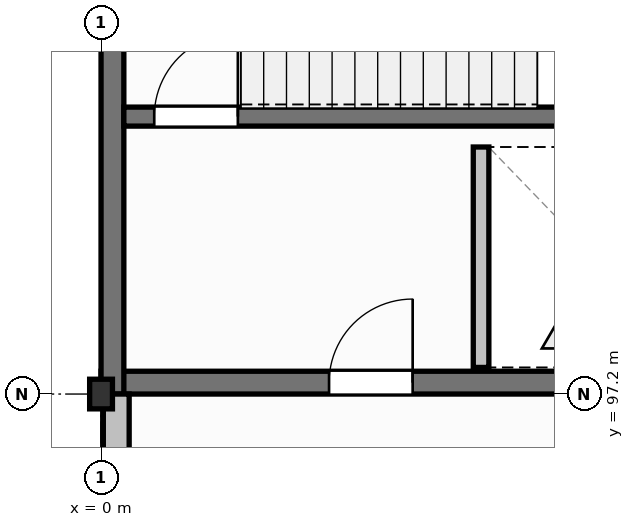
"""IFC4 building model, lengths in metres.
Left out: names, types, materials, properties, quantities, classifications, styles, units other than length and angle.
Written with IfcOpenShell. Run it as: python <this file> out.ifc"""

import sys

from ifc_helpers import new_model, si_unit, direction, frame, frame_2d, origin, origin_2d, place, context, subcontext, project, spatial, rectangle, i_section, extrude, element, fill, save


model = new_model("IFC4")
c1 = context("Model", 3, precision=1e-05, world=origin(), true_north=direction((0.0, 1.0)))
c2 = subcontext(c1, "Body", "Model", "MODEL_VIEW")
j1 = project(units=[si_unit("LENGTHUNIT", "METRE"), si_unit("PLANEANGLEUNIT", "RADIAN")], contexts=[c1])
p1 = place(None, origin())
s1 = spatial("IfcSite", under=j1, at=p1, CompositionType="ELEMENT")
p2 = place(p1, origin())
s2 = spatial("IfcBuilding", under=s1, at=p2, CompositionType="ELEMENT")
p3 = place(p2, frame((0.0, 0.0, 17.25)))
s3 = spatial("IfcBuildingStorey", under=s2, at=p3, CompositionType="ELEMENT", Elevation=17.25)
p4 = place(p3, frame((0.0, 97.35, 0.0), z_axis=(0.0, 0.0, 1.0), x_axis=(1.0, 0.0, 0.0)))
e1 = element("IfcWall", 1, at=p4, inside=s3, PredefinedType="SHEAR", context=c2, shape_type="SweptSolid", body=[
    extrude(rectangle(XDim=8.4, YDim=0.3, at=frame_2d((4.2, 0.0))), origin(), (0.0, 0.0, 1.0), 4.05),
])
p5 = place(p4, frame((3.0, 0.0, 0.0)))
e2 = element("IfcOpeningElement", 2, at=p5, cuts=e1, PredefinedType="OPENING", context=c2, shape_type="SweptSolid", body=[
    extrude(rectangle(XDim=1.1, YDim=2.15, at=frame_2d((0.55, 1.075))), frame((0.0, 0.16, 0.0), z_axis=(0.0, -1.0, 0.0), x_axis=(1.0, 0.0, 0.0)), (0.0, 0.0, 1.0), 0.32),
])
p6 = place(p3, frame((0.15, 97.2, 0.0), z_axis=(0.0, 0.0, 1.0), x_axis=(0.0, 1.0, 0.0)))
e3 = element("IfcWall", 3, at=p6, inside=s3, PredefinedType="SHEAR", context=c2, shape_type="SweptSolid", body=[
    extrude(rectangle(XDim=7.2, YDim=0.3, at=frame_2d((3.6, 0.0))), origin(), (0.0, 0.0, 1.0), 4.05),
])
p7 = place(p3, frame((0.3, 100.85, 0.0), z_axis=(0.0, 0.0, 1.0), x_axis=(1.0, 0.0, 0.0)))
e4 = element("IfcWall", 4, at=p7, inside=s3, PredefinedType="SHEAR", context=c2, shape_type="SweptSolid", body=[
    extrude(rectangle(XDim=7.8, YDim=0.25, at=frame_2d((3.9, 0.0))), origin(), (0.0, 0.0, 1.0), 4.05),
])
p8 = place(p7, frame((0.4, 0.0, 0.0)))
e5 = element("IfcOpeningElement", 5, at=p8, cuts=e4, PredefinedType="OPENING", context=c2, shape_type="SweptSolid", body=[
    extrude(rectangle(XDim=1.1, YDim=2.15, at=frame_2d((0.55, 1.075))), frame((0.0, 0.135, 0.0), z_axis=(0.0, -1.0, 0.0), x_axis=(1.0, 0.0, 0.0)), (0.0, 0.0, 1.0), 0.27),
])
p9 = place(p3, frame((0.0, 97.2, 0.0), z_axis=(0.0, 0.0, 1.0), x_axis=(1.0, 0.0, 0.0)))
e6 = element("IfcColumn", 6, at=p9, inside=s3, PredefinedType="COLUMN", context=c2, shape_type="SweptSolid", body=[
    extrude(i_section(OverallWidth=0.3, OverallDepth=0.39, WebThickness=0.011, FlangeThickness=0.019, FilletRadius=0.027, at=origin_2d()), origin(), (0.0, 0.0, 1.0), 4.05),
])
p10 = place(p3, frame((0.2, 90.0, 0.0), z_axis=(0.0, 0.0, 1.0), x_axis=(0.0, 1.0, 0.0)))
e7 = element("IfcWall", 7, at=p10, inside=s3, PredefinedType="SOLIDWALL", context=c2, shape_type="SweptSolid", body=[
    extrude(rectangle(XDim=7.2, YDim=0.34, at=frame_2d((3.6, 0.0))), origin(), (0.0, 0.0, 1.0), 3.328),
])
p11 = place(p10, frame((1.2, 0.0, 0.85)))
e8 = element("IfcOpeningElement", 8, at=p11, cuts=e7, PredefinedType="OPENING", context=c2, shape_type="SweptSolid", body=[
    extrude(rectangle(XDim=2.4, YDim=2.05, at=frame_2d((1.2, 1.025))), frame((0.0, 0.18, 0.0), z_axis=(0.0, -1.0, 0.0), x_axis=(1.0, 0.0, 0.0)), (0.0, 0.0, 1.0), 0.36),
])
p12 = place(p10, frame((4.175, 0.0, 0.85)))
e9 = element("IfcOpeningElement", 9, at=p12, cuts=e7, PredefinedType="OPENING", context=c2, shape_type="SweptSolid", body=[
    extrude(rectangle(XDim=1.25, YDim=1.5, at=frame_2d((0.625, 0.75))), frame((0.0, 0.18, 0.0), z_axis=(0.0, -1.0, 0.0), x_axis=(1.0, 0.0, 0.0)), (0.0, 0.0, 1.0), 0.36),
])
p13 = place(p3, frame((5.0, 97.55, 0.0), z_axis=(0.0, 0.0, 1.0), x_axis=(0.0, 1.0, 0.0)))
e10 = element("IfcWall", 10, at=p13, inside=s3, PredefinedType="PARTITIONING", context=c2, shape_type="SweptSolid", body=[
    extrude(rectangle(XDim=2.9, YDim=0.205, at=frame_2d((1.45, 0.0))), origin(), (0.0, 0.0, 1.0), 3.78),
])
p14 = place(p8, origin())
e11 = element("IfcDoor", 11, at=p14, inside=s3, OperationType="SINGLE_SWING_RIGHT", PredefinedType="DOOR", context=c2, shape_type="SweptSolid", body=[
    extrude(rectangle(XDim=1.1, YDim=2.15, at=frame_2d((0.55, 1.075))), frame((0.0, 0.025, 0.0), z_axis=(0.0, -1.0, 0.0), x_axis=(1.0, 0.0, 0.0)), (0.0, 0.0, 1.0), 0.05),
])
fill(e5, e11)
p15 = place(p5, origin())
e12 = element("IfcDoor", 12, at=p15, inside=s3, OperationType="SINGLE_SWING_RIGHT", PredefinedType="DOOR", context=c2, shape_type="SweptSolid", body=[
    extrude(rectangle(XDim=1.1, YDim=2.15, at=frame_2d((0.55, 1.075))), frame((0.0, 0.025, 0.0), z_axis=(0.0, -1.0, 0.0), x_axis=(1.0, 0.0, 0.0)), (0.0, 0.0, 1.0), 0.05),
])
fill(e2, e12)
save(model, sys.argv[1])
